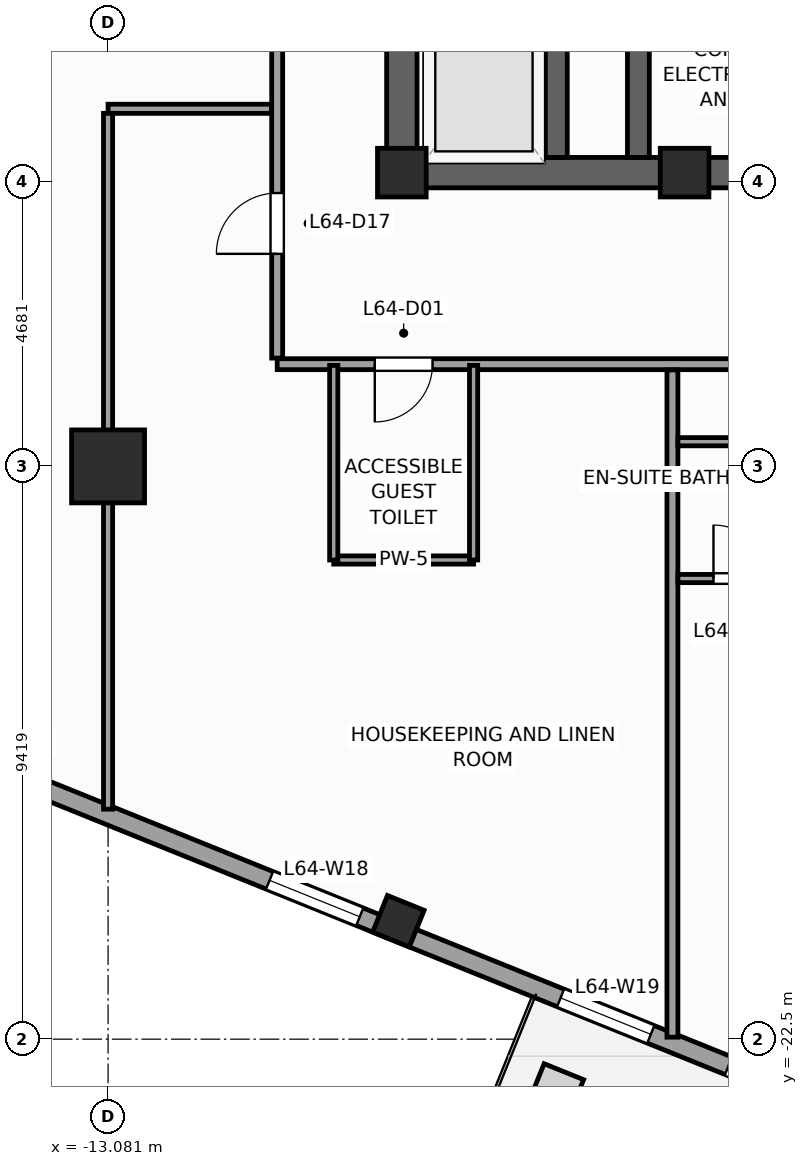
"""IFC4 building model, lengths in metres.
Left out: names, types, materials, properties, quantities, classifications, styles, units other than length and angle.
Written with IfcOpenShell. Run it as: python <this file> out.ifc"""

import sys

from ifc_helpers import new_model, si_unit, direction, frame, frame_2d, origin, origin_2d, place, context, subcontext, project, spatial, rectangle, extrude, source, transform, mapped, element, fill, save


model = new_model("IFC4")
c1 = context("Model", 3, precision=1e-05, world=origin(), true_north=direction((0.0, 1.0)))
c2 = subcontext(c1, "Body", "Model", "MODEL_VIEW")
j1 = project(units=[si_unit("LENGTHUNIT", "METRE"), si_unit("PLANEANGLEUNIT", "RADIAN")], contexts=[c1])
p1 = place(None, origin())
s1 = spatial("IfcSite", under=j1, at=p1, CompositionType="ELEMENT")
p2 = place(p1, origin())
s2 = spatial("IfcBuilding", under=s1, at=p2, CompositionType="ELEMENT")
p3 = place(p2, frame((0.0, 0.0, 265.2)))
s3 = spatial("IfcBuildingStorey", under=s2, at=p3, CompositionType="ELEMENT", Elevation=265.2)
p4 = place(p3, frame((-8.5, -8.25, 0.0), z_axis=(0.0, 0.0, 1.0), x_axis=(1.0, 0.0, 0.0)))
e1 = element("IfcWall", 1, at=p4, inside=s3, PredefinedType="SHEAR", context=c2, shape_type="SweptSolid", body=[
    extrude(rectangle(XDim=17.0, YDim=0.5, at=frame_2d((8.5, 0.0))), origin(), (0.0, 0.0, 1.0), 3.6),
])
p5 = place(p4, frame((7.85, 0.0, 0.0)))
e2 = element("IfcOpeningElement", 2, at=p5, cuts=e1, PredefinedType="OPENING", context=c2, shape_type="SweptSolid", body=[
    extrude(rectangle(XDim=1.3, YDim=2.2, at=frame_2d((0.65, 1.1))), frame((0.0, 0.26, 0.0), z_axis=(0.0, -1.0, 0.0), x_axis=(1.0, 0.0, 0.0)), (0.0, 0.0, 1.0), 0.52),
])
p6 = place(p3, frame((-8.25, -8.0, 0.0), z_axis=(0.0, 0.0, 1.0), x_axis=(0.0, 1.0, 0.0)))
e3 = element("IfcWall", 3, at=p6, inside=s3, PredefinedType="SHEAR", context=c2, shape_type="SweptSolid", body=[
    extrude(rectangle(XDim=16.0, YDim=0.5, at=frame_2d((8.0, 0.0))), origin(), (0.0, 0.0, 1.0), 3.6),
])
p7 = place(p6, frame((4.69, 0.0, 0.0)))
e4 = element("IfcOpeningElement", 4, at=p7, cuts=e3, PredefinedType="OPENING", context=c2, shape_type="SweptSolid", body=[
    extrude(rectangle(XDim=1.3, YDim=2.2, at=frame_2d((0.65, 1.1))), frame((0.0, 0.26, 0.0), z_axis=(0.0, -1.0, 0.0), x_axis=(1.0, 0.0, 0.0)), (0.0, 0.0, 1.0), 0.52),
])
p8 = place(p3, frame((-4.36, -8.0, 0.0), z_axis=(0.0, 0.0, 1.0), x_axis=(0.0, 1.0, 0.0)))
e5 = element("IfcWall", 5, at=p8, inside=s3, PredefinedType="SHEAR", context=c2, shape_type="SweptSolid", body=[
    extrude(rectangle(XDim=16.0, YDim=0.36, at=frame_2d((8.0, 0.0))), origin(), (0.0, 0.0, 1.0), 3.6),
])
p9 = place(p3, frame((-5.71, -8.0, 0.0), z_axis=(0.0, 0.0, 1.0), x_axis=(0.0, 1.0, 0.0)))
e6 = element("IfcWall", 6, at=p9, inside=s3, PredefinedType="SHEAR", context=c2, shape_type="SweptSolid", body=[
    extrude(rectangle(XDim=2.54, YDim=0.36, at=frame_2d((1.27, 0.0))), origin(), (0.0, 0.0, 1.0), 3.6),
])
m1 = source(origin(), c2, "Body", "SweptSolid", [
    extrude(rectangle(XDim=0.8, YDim=0.8, at=origin_2d()), origin(), (0.0, 0.0, 1.0), 3.6),
])
for number, where, z_axis, x_axis in (
    (7, (-8.25, -8.25, 0.0), (0.0, 0.0, 1.0), (1.0, 0.0, 0.0)),
    (8, (-3.6, -8.25, 0.0), (0.0, 0.0, 1.0), (1.0, 0.0, 0.0)),
):
    element("IfcColumn", number, at=place(p3, frame(where, z_axis=z_axis, x_axis=x_axis)), inside=s3, PredefinedType="PILASTER", context=c2, shape_type="MappedRepresentation", body=[
        mapped(m1, transform((0.0, 0.0, 0.0), scale=1.0)),
    ])
m2 = source(origin(), c2, "Body", "SweptSolid", [
    extrude(rectangle(XDim=1.2, YDim=1.2, at=origin_2d()), origin(), (0.0, 0.0, 1.0), 3.6),
])
p10 = place(p3, frame((-13.081, -13.081, 0.0), z_axis=(0.0, 0.0, 1.0), x_axis=(1.0, 0.0, 0.0)))
e9 = element("IfcColumn", 9, at=p10, inside=s3, PredefinedType="COLUMN", context=c2, shape_type="MappedRepresentation", body=[
    mapped(m2, transform((0.0, 0.0, 0.0), scale=1.0)),
])
m3 = source(origin(), c2, "Body", "SweptSolid", [
    extrude(rectangle(XDim=0.65, YDim=0.65, at=origin_2d()), origin(), (0.0, 0.0, 1.0), 3.6),
])
p11 = place(p3, frame((-8.307, -20.56, 0.0), z_axis=(0.0, 0.0, 1.0), x_axis=(0.374606593416, 0.927183854567, 0.0)))
e10 = element("IfcColumn", 10, at=p11, inside=s3, PredefinedType="COLUMN", context=c2, shape_type="MappedRepresentation", body=[
    mapped(m3, transform((0.0, 0.0, 0.0), scale=1.0)),
])
p12 = place(p3, frame((-23.813, -14.479, 0.0), z_axis=(0.0, 0.0, 1.0), x_axis=(0.927182657188, -0.374609557019, 0.0)))
e11 = element("IfcWall", 11, at=p12, inside=s3, PredefinedType="STANDARD", context=c2, shape_type="SweptSolid", body=[
    extrude(rectangle(XDim=33.31, YDim=0.31, at=frame_2d((16.655, 0.0))), origin(), (0.0, 0.0, 1.0), 2.75),
])
p13 = place(p12, frame((22.58, 0.0, 0.0)))
e12 = element("IfcOpeningElement", 12, at=p13, cuts=e11, PredefinedType="OPENING", context=c2, shape_type="SweptSolid", body=[
    extrude(rectangle(XDim=1.05, YDim=2.25, at=frame_2d((0.525, 1.125))), frame((0.0, 0.165, 0.0), z_axis=(0.0, -1.0, 0.0), x_axis=(1.0, 0.0, 0.0)), (0.0, 0.0, 1.0), 0.33),
])
p14 = place(p12, frame((3.197, 0.0, 0.47)))
e13 = element("IfcOpeningElement", 13, at=p14, cuts=e11, PredefinedType="OPENING", context=c2, shape_type="SweptSolid", body=[
    extrude(rectangle(XDim=1.6, YDim=2.1, at=frame_2d((0.8, 1.05))), frame((0.0, 0.165, 0.0), z_axis=(0.0, -1.0, 0.0), x_axis=(1.0, 0.0, 0.0)), (0.0, 0.0, 1.0), 0.33),
])
p15 = place(p12, frame((8.86, 0.0, 0.47)))
e14 = element("IfcOpeningElement", 14, at=p15, cuts=e11, PredefinedType="OPENING", context=c2, shape_type="SweptSolid", body=[
    extrude(rectangle(XDim=1.6, YDim=2.1, at=frame_2d((0.8, 1.05))), frame((0.0, 0.165, 0.0), z_axis=(0.0, -1.0, 0.0), x_axis=(1.0, 0.0, 0.0)), (0.0, 0.0, 1.0), 0.33),
])
p16 = place(p12, frame((14.439, 0.0, 0.47)))
e15 = element("IfcOpeningElement", 15, at=p16, cuts=e11, PredefinedType="OPENING", context=c2, shape_type="SweptSolid", body=[
    extrude(rectangle(XDim=1.6, YDim=2.1, at=frame_2d((0.8, 1.05))), frame((0.0, 0.165, 0.0), z_axis=(0.0, -1.0, 0.0), x_axis=(1.0, 0.0, 0.0)), (0.0, 0.0, 1.0), 0.33),
])
p17 = place(p12, frame((19.601, 0.0, 0.47)))
e16 = element("IfcOpeningElement", 16, at=p17, cuts=e11, PredefinedType="OPENING", context=c2, shape_type="SweptSolid", body=[
    extrude(rectangle(XDim=1.6, YDim=2.1, at=frame_2d((0.8, 1.05))), frame((0.0, 0.165, 0.0), z_axis=(0.0, -1.0, 0.0), x_axis=(1.0, 0.0, 0.0)), (0.0, 0.0, 1.0), 0.33),
])
p18 = place(p12, frame((27.097, 0.0, 0.47)))
e17 = element("IfcOpeningElement", 17, at=p18, cuts=e11, PredefinedType="OPENING", context=c2, shape_type="SweptSolid", body=[
    extrude(rectangle(XDim=1.6, YDim=2.1, at=frame_2d((0.8, 1.05))), frame((0.0, 0.165, 0.0), z_axis=(0.0, -1.0, 0.0), x_axis=(1.0, 0.0, 0.0)), (0.0, 0.0, 1.0), 0.33),
])
p19 = place(p3, frame((-10.3, -11.4, 0.0), z_axis=(0.0, 0.0, 1.0), x_axis=(1.0, 0.0, 0.0)))
e18 = element("IfcWall", 18, at=p19, inside=s3, PredefinedType="PARTITIONING", context=c2, shape_type="SweptSolid", body=[
    extrude(rectangle(XDim=21.7, YDim=0.18, at=frame_2d((10.85, 0.0))), origin(), (0.0, 0.0, 1.0), 3.35),
])
p20 = place(p19, frame((1.605, 0.0, 0.0)))
e19 = element("IfcOpeningElement", 19, at=p20, cuts=e18, PredefinedType="OPENING", context=c2, shape_type="SweptSolid", body=[
    extrude(rectangle(XDim=0.95, YDim=2.1, at=frame_2d((0.475, 1.05))), frame((0.0, 0.1, 0.0), z_axis=(0.0, -1.0, 0.0), x_axis=(1.0, 0.0, 0.0)), (0.0, 0.0, 1.0), 0.2),
])
p21 = place(p19, frame((17.236, 0.0, 0.0)))
e20 = element("IfcOpeningElement", 20, at=p21, cuts=e18, PredefinedType="OPENING", context=c2, shape_type="SweptSolid", body=[
    extrude(rectangle(XDim=1.0, YDim=2.15, at=frame_2d((0.5, 1.075))), frame((0.0, 0.1, 0.0), z_axis=(0.0, -1.0, 0.0), x_axis=(1.0, 0.0, 0.0)), (0.0, 0.0, 1.0), 0.2),
])
p22 = place(p19, frame((9.8, 0.0, 0.0)))
e21 = element("IfcOpeningElement", 21, at=p22, cuts=e18, PredefinedType="OPENING", context=c2, shape_type="SweptSolid", body=[
    extrude(rectangle(XDim=1.0, YDim=2.15, at=frame_2d((0.5, 1.075))), frame((0.0, 0.1, 0.0), z_axis=(0.0, -1.0, 0.0), x_axis=(1.0, 0.0, 0.0)), (0.0, 0.0, 1.0), 0.2),
])
p23 = place(p3, frame((-10.3, -11.3, 0.0), z_axis=(0.0, 0.0, 1.0), x_axis=(0.0, 1.0, 0.0)))
e22 = element("IfcWall", 22, at=p23, inside=s3, PredefinedType="PARTITIONING", context=c2, shape_type="SweptSolid", body=[
    extrude(rectangle(XDim=21.5, YDim=0.18, at=frame_2d((10.75, 0.0))), origin(), (0.0, 0.0, 1.0), 3.35),
])
p24 = place(p23, frame((12.9, 0.0, 0.0)))
e23 = element("IfcOpeningElement", 23, at=p24, cuts=e22, PredefinedType="OPENING", context=c2, shape_type="SweptSolid", body=[
    extrude(rectangle(XDim=1.0, YDim=2.15, at=frame_2d((0.5, 1.075))), frame((0.0, 0.1, 0.0), z_axis=(0.0, -1.0, 0.0), x_axis=(1.0, 0.0, 0.0)), (0.0, 0.0, 1.0), 0.2),
])
p25 = place(p23, frame((17.736, 0.0, 0.0)))
e24 = element("IfcOpeningElement", 24, at=p25, cuts=e22, PredefinedType="OPENING", context=c2, shape_type="SweptSolid", body=[
    extrude(rectangle(XDim=1.0, YDim=2.15, at=frame_2d((0.5, 1.075))), frame((0.0, 0.1, 0.0), z_axis=(0.0, -1.0, 0.0), x_axis=(1.0, 0.0, 0.0)), (0.0, 0.0, 1.0), 0.2),
])
p26 = place(p23, frame((1.714, 0.0, 0.0)))
e25 = element("IfcOpeningElement", 25, at=p26, cuts=e22, PredefinedType="OPENING", context=c2, shape_type="SweptSolid", body=[
    extrude(rectangle(XDim=1.0, YDim=2.15, at=frame_2d((0.5, 1.075))), frame((0.0, 0.1, 0.0), z_axis=(0.0, -1.0, 0.0), x_axis=(1.0, 0.0, 0.0)), (0.0, 0.0, 1.0), 0.2),
])
p27 = place(p23, frame((5.4, 0.0, 0.0)))
e26 = element("IfcOpeningElement", 26, at=p27, cuts=e22, PredefinedType="OPENING", context=c2, shape_type="SweptSolid", body=[
    extrude(rectangle(XDim=1.0, YDim=2.15, at=frame_2d((0.5, 1.075))), frame((0.0, 0.1, 0.0), z_axis=(0.0, -1.0, 0.0), x_axis=(1.0, 0.0, 0.0)), (0.0, 0.0, 1.0), 0.2),
])
p28 = place(p23, frame((9.1, 0.0, 0.0)))
e27 = element("IfcOpeningElement", 27, at=p28, cuts=e22, PredefinedType="OPENING", context=c2, shape_type="SweptSolid", body=[
    extrude(rectangle(XDim=1.0, YDim=2.15, at=frame_2d((0.5, 1.075))), frame((0.0, 0.1, 0.0), z_axis=(0.0, -1.0, 0.0), x_axis=(1.0, 0.0, 0.0)), (0.0, 0.0, 1.0), 0.2),
])
p29 = place(p3, frame((-3.8, -11.495, 0.0), z_axis=(0.0, 0.0, 1.0), x_axis=(0.0, -1.0, 0.0)))
e28 = element("IfcWall", 28, at=p29, inside=s3, PredefinedType="PARTITIONING", context=c2, shape_type="SweptSolid", body=[
    extrude(rectangle(XDim=10.972, YDim=0.18, at=frame_2d((5.486, 0.0))), origin(), (0.0, 0.0, 1.0), 3.35),
])
p30 = place(p3, frame((-10.395, -7.2, 0.0), z_axis=(0.0, 0.0, 1.0), x_axis=(-1.0, 0.0, 0.0)))
e29 = element("IfcWall", 29, at=p30, inside=s3, PredefinedType="PARTITIONING", context=c2, shape_type="SweptSolid", body=[
    extrude(rectangle(XDim=2.686, YDim=0.15, at=frame_2d((1.343, 0.0))), origin(), (0.0, 0.0, 1.0), 3.35),
])
p31 = place(p3, frame((-13.081, -7.275, 0.0), z_axis=(0.0, 0.0, 1.0), x_axis=(0.0, -1.0, 0.0)))
e30 = element("IfcWall", 30, at=p31, inside=s3, PredefinedType="PARTITIONING", context=c2, shape_type="SweptSolid", body=[
    extrude(rectangle(XDim=11.443, YDim=0.15, at=frame_2d((5.721, 0.0))), origin(), (0.0, 0.0, 1.0), 2.45),
])
p32 = place(p3, frame((-9.37, -14.62, 0.0), z_axis=(0.0, 0.0, 1.0), x_axis=(1.0, 0.0, 0.0)))
e31 = element("IfcWall", 31, at=p32, inside=s3, PredefinedType="PARTITIONING", context=c2, shape_type="SweptSolid", body=[
    extrude(rectangle(XDim=2.3, YDim=0.135, at=frame_2d((1.15, 0.0))), origin(), (0.0, 0.0, 1.0), 2.95),
])
for number, where, z_axis, x_axis in (
    (32, (-7.07, -14.62, 0.0), (0.0, 0.0, 1.0), (0.0, 1.0, 0.0)),
    (33, (-9.37, -14.62, 0.0), (0.0, 0.0, 1.0), (0.0, 1.0, 0.0)),
):
    element("IfcWall", number, at=place(p3, frame(where, z_axis=z_axis, x_axis=x_axis)), inside=s3, PredefinedType="PARTITIONING", context=c2, shape_type="SweptSolid", body=[
        extrude(rectangle(XDim=3.2, YDim=0.135, at=frame_2d((1.6, 0.0))), origin(), (0.0, 0.0, 1.0), 3.35),
    ])
p33 = place(p3, frame((-3.71, -14.925, 0.0), z_axis=(0.0, 0.0, 1.0), x_axis=(1.0, 0.0, 0.0)))
e34 = element("IfcWall", 34, at=p33, inside=s3, PredefinedType="PARTITIONING", context=c2, shape_type="SweptSolid", body=[
    extrude(rectangle(XDim=2.05, YDim=0.135, at=frame_2d((1.025, 0.0))), origin(), (0.0, 0.0, 1.0), 3.35),
])
p34 = place(p33, frame((0.585, 0.0, 0.0)))
e35 = element("IfcOpeningElement", 35, at=p34, cuts=e34, PredefinedType="OPENING", context=c2, shape_type="SweptSolid", body=[
    extrude(rectangle(XDim=0.88, YDim=2.1, at=frame_2d((0.44, 1.05))), frame((0.0, 0.078, 0.0), z_axis=(0.0, -1.0, 0.0), x_axis=(1.0, 0.0, 0.0)), (0.0, 0.0, 1.0), 0.155),
])
p35 = place(p3, frame((-3.71, -12.675, 0.0), z_axis=(0.0, 0.0, 1.0), x_axis=(1.0, 0.0, 0.0)))
e36 = element("IfcWall", 36, at=p35, inside=s3, PredefinedType="PARTITIONING", context=c2, shape_type="SweptSolid", body=[
    extrude(rectangle(XDim=2.05, YDim=0.135, at=frame_2d((1.025, 0.0))), origin(), (0.0, 0.0, 1.0), 3.35),
])
m4 = source(origin(), c2, "Body", "SweptSolid", [
    extrude(rectangle(XDim=1.05, YDim=2.25, at=frame_2d((0.525, 1.125))), frame((0.0, 0.025, 0.0), z_axis=(0.0, -1.0, 0.0), x_axis=(1.0, 0.0, 0.0)), (0.0, 0.0, 1.0), 0.05),
])
p36 = place(p13, origin())
e37 = element("IfcDoor", 37, at=p36, inside=s3, OperationType="SINGLE_SWING_LEFT", PredefinedType="DOOR", context=c2, shape_type="MappedRepresentation", body=[
    mapped(m4, transform((0.0, 0.0, 0.0), scale=1.0)),
])
fill(e12, e37)
m5 = source(origin(), c2, "Body", "SweptSolid", [
    extrude(rectangle(XDim=1.6, YDim=2.1, at=frame_2d((0.8, 1.05))), frame((0.0, 0.03, 0.0), z_axis=(0.0, -1.0, 0.0), x_axis=(1.0, 0.0, 0.0)), (0.0, 0.0, 1.0), 0.06),
])
p37 = place(p16, origin())
e38 = element("IfcWindow", 38, at=p37, inside=s3, PartitioningType="SINGLE_PANEL", PredefinedType="WINDOW", context=c2, shape_type="MappedRepresentation", body=[
    mapped(m5, transform((0.0, 0.0, 0.0), scale=1.0)),
])
fill(e15, e38)
p38 = place(p17, origin())
e39 = element("IfcWindow", 39, at=p38, inside=s3, PartitioningType="SINGLE_PANEL", PredefinedType="WINDOW", context=c2, shape_type="MappedRepresentation", body=[
    mapped(m5, transform((0.0, 0.0, 0.0), scale=1.0)),
])
fill(e16, e39)
m6 = source(origin(), c2, "Body", "SweptSolid", [
    extrude(rectangle(XDim=0.95, YDim=2.1, at=frame_2d((0.475, 1.05))), frame((0.0, 0.025, 0.0), z_axis=(0.0, -1.0, 0.0), x_axis=(1.0, 0.0, 0.0)), (0.0, 0.0, 1.0), 0.05),
])
p39 = place(p20, frame((0.95, 0.0, 0.0), z_axis=(0.0, 0.0, 1.0), x_axis=(-1.0, 0.0, 0.0)))
e40 = element("IfcDoor", 40, at=p39, inside=s3, OperationType="SINGLE_SWING_LEFT", PredefinedType="DOOR", context=c2, shape_type="MappedRepresentation", body=[
    mapped(m6, transform((0.0, 0.0, 0.0), scale=1.0)),
])
fill(e19, e40)
m7 = source(origin(), c2, "Body", "SweptSolid", [
    extrude(rectangle(XDim=0.88, YDim=2.1, at=frame_2d((0.44, 1.05))), frame((0.0, 0.025, 0.0), z_axis=(0.0, -1.0, 0.0), x_axis=(1.0, 0.0, 0.0)), (0.0, 0.0, 1.0), 0.05),
])
p40 = place(p34, origin())
e41 = element("IfcDoor", 41, at=p40, inside=s3, OperationType="SINGLE_SWING_LEFT", PredefinedType="DOOR", context=c2, shape_type="MappedRepresentation", body=[
    mapped(m7, transform((0.0, 0.0, 0.0), scale=1.0)),
])
fill(e35, e41)
m8 = source(origin(), c2, "Body", "SweptSolid", [
    extrude(rectangle(XDim=1.0, YDim=2.15, at=frame_2d((0.5, 1.075))), frame((0.0, 0.025, 0.0), z_axis=(0.0, -1.0, 0.0), x_axis=(1.0, 0.0, 0.0)), (0.0, 0.0, 1.0), 0.05),
])
p41 = place(p26, origin())
e42 = element("IfcDoor", 42, at=p41, inside=s3, OperationType="SINGLE_SWING_LEFT", PredefinedType="DOOR", context=c2, shape_type="MappedRepresentation", body=[
    mapped(m8, transform((0.0, 0.0, 0.0), scale=1.0)),
])
fill(e25, e42)
save(model, sys.argv[1])
